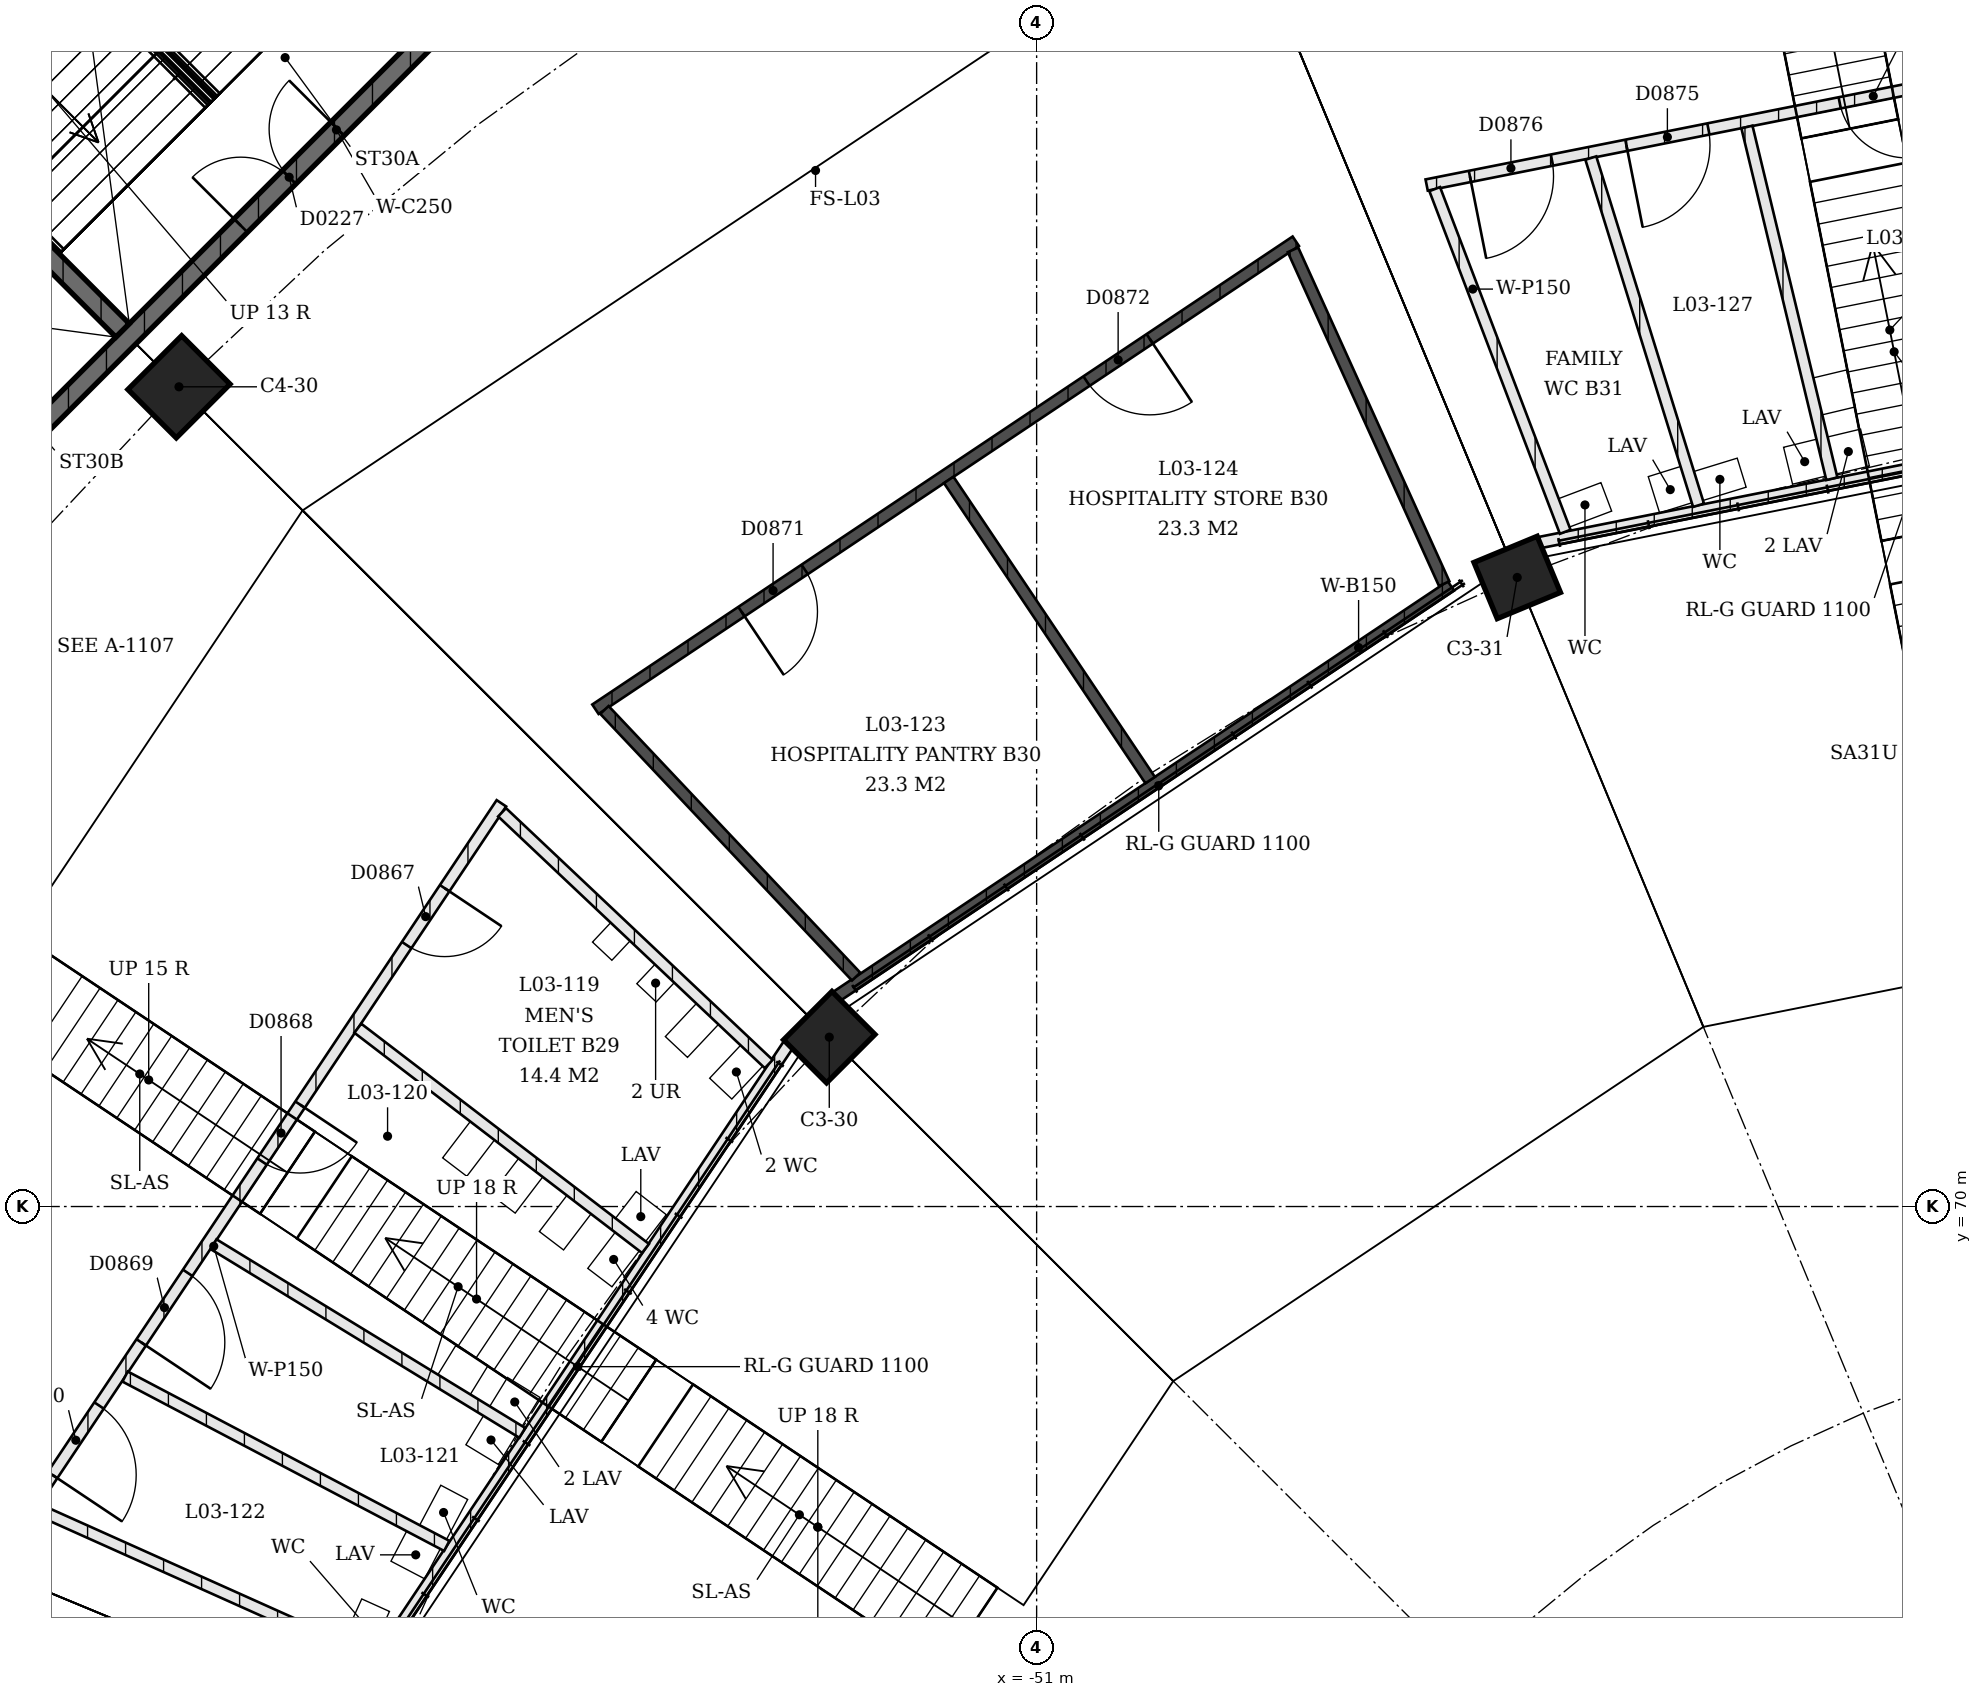
"""IFC4 building model, lengths in metres.
Left out: names, types, materials, properties, quantities, classifications, styles, units other than length and angle.
Written with IfcOpenShell. Run it as: python <this file> out.ifc"""

import sys

from ifc_helpers import new_model, si_unit, direction, frame, frame_2d, origin, origin_2d, place, context, subcontext, project, spatial, rectangle, extrude, element, fill, save


model = new_model("IFC4")
c1 = context("Model", 3, precision=1e-05, world=origin(), true_north=direction((0.0, 1.0)))
c2 = subcontext(c1, "Body", "Model", "MODEL_VIEW")
j1 = project(units=[si_unit("LENGTHUNIT", "METRE"), si_unit("PLANEANGLEUNIT", "RADIAN")], contexts=[c1])
p1 = place(None, origin())
s1 = spatial("IfcSite", under=j1, at=p1, CompositionType="ELEMENT")
p2 = place(p1, origin())
s2 = spatial("IfcBuilding", under=s1, at=p2, CompositionType="ELEMENT")
p3 = place(p2, frame((0.0, 0.0, 13.5)))
s3 = spatial("IfcBuildingStorey", under=s2, at=p3, CompositionType="ELEMENT", Elevation=13.5)
p4 = place(p3, frame((-53.728, 72.228, 0.0), z_axis=(0.0, 0.0, 1.0), x_axis=(-0.707106781187, -0.707106781187, 0.0)))
e1 = element("IfcColumn", 1, at=p4, inside=s3, PredefinedType="COLUMN", context=c2, shape_type="SweptSolid", body=[
    extrude(rectangle(XDim=0.9, YDim=0.8, at=origin_2d()), origin(), (0.0, 0.0, 1.0), 2.033),
])
p5 = place(p3, frame((-62.284, 80.784, 0.0), z_axis=(0.0, 0.0, 1.0), x_axis=(-0.707106781187, -0.707106781187, 0.0)))
e2 = element("IfcColumn", 2, at=p5, inside=s3, PredefinedType="COLUMN", context=c2, shape_type="SweptSolid", body=[
    extrude(rectangle(XDim=1.0, YDim=0.9, at=origin_2d()), origin(), (0.0, 0.0, 1.0), 4.5),
])
p6 = place(p3, frame((-44.677, 78.276, 0.0), z_axis=(0.0, 0.0, 1.0), x_axis=(-0.923879532511, -0.382683432365, 0.0)))
e3 = element("IfcColumn", 3, at=p6, inside=s3, PredefinedType="COLUMN", context=c2, shape_type="SweptSolid", body=[
    extrude(rectangle(XDim=0.9, YDim=0.8, at=origin_2d()), origin(), (0.0, 0.0, 1.0), 2.033),
])
p7 = place(p3, frame((-58.643, 85.734, 0.0), z_axis=(0.0, 0.0, 1.0), x_axis=(-0.707106781187, -0.707106781187, 0.0)))
e4 = element("IfcWall", 4, at=p7, inside=s3, PredefinedType="SHEAR", context=c2, shape_type="SweptSolid", body=[
    extrude(rectangle(XDim=12.15, YDim=0.25, at=frame_2d((6.075, 0.0))), origin(), (0.0, 0.0, 1.0), 4.09),
])
p8 = place(p7, frame((2.2, 0.0, 0.0)))
e5 = element("IfcOpeningElement", 5, at=p8, cuts=e4, PredefinedType="OPENING", context=c2, shape_type="SweptSolid", body=[
    extrude(rectangle(XDim=1.8, YDim=2.1, at=frame_2d((0.9, 1.05))), frame((0.0, 0.125, 0.0), z_axis=(0.0, -1.0, 0.0), x_axis=(1.0, 0.0, 0.0)), (0.0, 0.0, 1.0), 0.25),
])
p9 = place(p7, frame((8.15, 0.0, 0.0)))
e6 = element("IfcOpeningElement", 6, at=p9, cuts=e4, PredefinedType="OPENING", context=c2, shape_type="SweptSolid", body=[
    extrude(rectangle(XDim=1.8, YDim=2.1, at=frame_2d((0.9, 1.05))), frame((0.0, 0.125, 0.0), z_axis=(0.0, -1.0, 0.0), x_axis=(1.0, 0.0, 0.0)), (0.0, 0.0, 1.0), 0.25),
])
p10 = place(p3, frame((-63.027, 81.527, 0.0), z_axis=(0.0, 0.0, 1.0), x_axis=(-0.707106781187, 0.707106781187, 0.0)))
e7 = element("IfcWall", 7, at=p10, inside=s3, PredefinedType="SHEAR", context=c2, shape_type="SweptSolid", body=[
    extrude(rectangle(XDim=7.46, YDim=0.25, at=frame_2d((3.73, 0.0))), origin(), (0.0, 0.0, 1.0), 4.09),
])
p11 = place(p3, frame((-54.266, 72.13, 0.0), z_axis=(0.0, 0.0, 1.0), x_axis=(-0.555562437394, -0.83147482112, 0.0)))
e8 = element("IfcWall", 8, at=p11, inside=s3, PredefinedType="PARTITIONING", context=c2, shape_type="SweptSolid", body=[
    extrude(rectangle(XDim=10.125, YDim=0.15, at=frame_2d((5.062, 0.0))), origin(), (0.0, 0.0, 1.0), 3.0),
])
p12 = place(p3, frame((-58.042, 75.305, 0.0), z_axis=(0.0, 0.0, 1.0), x_axis=(-0.555569460176, -0.8314701287, 0.0)))
e9 = element("IfcWall", 9, at=p12, inside=s3, PredefinedType="PARTITIONING", context=c2, shape_type="SweptSolid", body=[
    extrude(rectangle(XDim=11.209, YDim=0.15, at=frame_2d((5.604, 0.0))), origin(), (0.0, 0.0, 1.0), 3.0),
])
p13 = place(p12, frame((1.343, 0.0, 0.0)))
e10 = element("IfcOpeningElement", 10, at=p13, cuts=e9, PredefinedType="OPENING", context=c2, shape_type="SweptSolid", body=[
    extrude(rectangle(XDim=0.9, YDim=2.1, at=frame_2d((0.45, 1.05))), frame((0.0, 0.075, 0.0), z_axis=(0.0, -1.0, 0.0), x_axis=(1.0, 0.0, 0.0)), (0.0, 0.0, 1.0), 0.15),
])
p14 = place(p12, frame((4.768, 0.0, 0.0)))
e11 = element("IfcOpeningElement", 11, at=p14, cuts=e9, PredefinedType="OPENING", context=c2, shape_type="SweptSolid", body=[
    extrude(rectangle(XDim=0.9, YDim=2.1, at=frame_2d((0.45, 1.05))), frame((0.0, 0.075, 0.0), z_axis=(0.0, -1.0, 0.0), x_axis=(1.0, 0.0, 0.0)), (0.0, 0.0, 1.0), 0.15),
])
p15 = place(p12, frame((7.43, 0.0, 0.0)))
e12 = element("IfcOpeningElement", 12, at=p15, cuts=e9, PredefinedType="OPENING", context=c2, shape_type="SweptSolid", body=[
    extrude(rectangle(XDim=1.1, YDim=2.1, at=frame_2d((0.55, 1.05))), frame((0.0, 0.075, 0.0), z_axis=(0.0, -1.0, 0.0), x_axis=(1.0, 0.0, 0.0)), (0.0, 0.0, 1.0), 0.15),
])
p16 = place(p12, frame((9.529, 0.0, 0.0)))
e13 = element("IfcOpeningElement", 13, at=p16, cuts=e9, PredefinedType="OPENING", context=c2, shape_type="SweptSolid", body=[
    extrude(rectangle(XDim=1.1, YDim=2.1, at=frame_2d((0.55, 1.05))), frame((0.0, 0.075, 0.0), z_axis=(0.0, -1.0, 0.0), x_axis=(1.0, 0.0, 0.0)), (0.0, 0.0, 1.0), 0.15),
])
p17 = place(p3, frame((-54.525, 71.875, 0.0), z_axis=(0.0, 0.0, 1.0), x_axis=(-0.727182951144, 0.686443701672, 0.0)))
e14 = element("IfcWall", 14, at=p17, inside=s3, PredefinedType="PARTITIONING", context=c2, shape_type="SweptSolid", body=[
    extrude(rectangle(XDim=4.824, YDim=0.15, at=frame_2d((2.412, 0.0))), origin(), (0.0, 0.0, 1.0), 3.0),
])
p18 = place(p3, frame((-56.146, 69.448, 0.0), z_axis=(0.0, 0.0, 1.0), x_axis=(-0.794129534094, 0.607748536057, 0.0)))
e15 = element("IfcWall", 15, at=p18, inside=s3, PredefinedType="PARTITIONING", context=c2, shape_type="SweptSolid", body=[
    extrude(rectangle(XDim=4.767, YDim=0.15, at=frame_2d((2.383, 0.0))), origin(), (0.0, 0.0, 1.0), 3.0),
])
p19 = place(p3, frame((-57.767, 67.022, 0.0), z_axis=(0.0, 0.0, 1.0), x_axis=(-0.853324930284, 0.521379481142, 0.0)))
e16 = element("IfcWall", 16, at=p19, inside=s3, PredefinedType="PARTITIONING", context=c2, shape_type="SweptSolid", body=[
    extrude(rectangle(XDim=4.761, YDim=0.15, at=frame_2d((2.38, 0.0))), origin(), (0.0, 0.0, 1.0), 3.0),
])
p20 = place(p3, frame((-58.761, 65.535, 0.0), z_axis=(0.0, 0.0, 1.0), x_axis=(-0.884880573932, 0.465817957874, 0.0)))
e17 = element("IfcWall", 17, at=p20, inside=s3, PredefinedType="PARTITIONING", context=c2, shape_type="SweptSolid", body=[
    extrude(rectangle(XDim=4.783, YDim=0.15, at=frame_2d((2.392, 0.0))), origin(), (0.0, 0.0, 1.0), 3.0),
])
p21 = place(p3, frame((-59.754, 64.048, 0.0), z_axis=(0.0, 0.0, 1.0), x_axis=(-0.912468935825, 0.409145990025, 0.0)))
e18 = element("IfcWall", 18, at=p21, inside=s3, PredefinedType="PARTITIONING", context=c2, shape_type="SweptSolid", body=[
    extrude(rectangle(XDim=4.824, YDim=0.15, at=frame_2d((2.412, 0.0))), origin(), (0.0, 0.0, 1.0), 3.0),
])
p22 = place(p3, frame((-53.63, 72.766, 0.0), z_axis=(0.0, 0.0, 1.0), x_axis=(0.831481684117, 0.555552165847, 0.0)))
e19 = element("IfcWall", 19, at=p22, inside=s3, PredefinedType="SOLIDWALL", context=c2, shape_type="SweptSolid", body=[
    extrude(rectangle(XDim=9.718, YDim=0.15, at=frame_2d((4.859, 0.0))), origin(), (0.0, 0.0, 1.0), 3.0),
])
p23 = place(p3, frame((-56.805, 76.542, 0.0), z_axis=(0.0, 0.0, 1.0), x_axis=(0.831470287315, 0.555569222791, 0.0)))
e20 = element("IfcWall", 20, at=p23, inside=s3, PredefinedType="SOLIDWALL", context=c2, shape_type="SweptSolid", body=[
    extrude(rectangle(XDim=11.082, YDim=0.15, at=frame_2d((5.541, 0.0))), origin(), (0.0, 0.0, 1.0), 3.0),
])
p24 = place(p23, frame((2.311, 0.0, 0.0)))
e21 = element("IfcOpeningElement", 21, at=p24, cuts=e20, PredefinedType="OPENING", context=c2, shape_type="SweptSolid", body=[
    extrude(rectangle(XDim=1.0, YDim=2.1, at=frame_2d((0.5, 1.05))), frame((0.0, 0.075, 0.0), z_axis=(0.0, -1.0, 0.0), x_axis=(1.0, 0.0, 0.0)), (0.0, 0.0, 1.0), 0.15),
])
p25 = place(p23, frame((7.771, 0.0, 0.0)))
e22 = element("IfcOpeningElement", 22, at=p25, cuts=e20, PredefinedType="OPENING", context=c2, shape_type="SweptSolid", body=[
    extrude(rectangle(XDim=1.0, YDim=2.1, at=frame_2d((0.5, 1.05))), frame((0.0, 0.075, 0.0), z_axis=(0.0, -1.0, 0.0), x_axis=(1.0, 0.0, 0.0)), (0.0, 0.0, 1.0), 0.15),
])
p26 = place(p3, frame((-53.375, 73.025, 0.0), z_axis=(0.0, 0.0, 1.0), x_axis=(-0.686443701672, 0.727182951144, 0.0)))
e23 = element("IfcWall", 23, at=p26, inside=s3, PredefinedType="SOLIDWALL", context=c2, shape_type="SweptSolid", body=[
    extrude(rectangle(XDim=4.824, YDim=0.15, at=frame_2d((2.412, 0.0))), origin(), (0.0, 0.0, 1.0), 3.0),
])
p27 = place(p3, frame((-49.506, 75.61, 0.0), z_axis=(0.0, 0.0, 1.0), x_axis=(-0.557185009832, 0.830388381915, 0.0)))
e24 = element("IfcWall", 24, at=p27, inside=s3, PredefinedType="SOLIDWALL", context=c2, shape_type="SweptSolid", body=[
    extrude(rectangle(XDim=4.757, YDim=0.15, at=frame_2d((2.378, 0.0))), origin(), (0.0, 0.0, 1.0), 3.0),
])
p28 = place(p3, frame((-45.638, 78.195, 0.0), z_axis=(0.0, 0.0, 1.0), x_axis=(-0.412593178732, 0.910915401596, 0.0)))
e25 = element("IfcWall", 25, at=p28, inside=s3, PredefinedType="SOLIDWALL", context=c2, shape_type="SweptSolid", body=[
    extrude(rectangle(XDim=4.821, YDim=0.15, at=frame_2d((2.411, 0.0))), origin(), (0.0, 0.0, 1.0), 3.0),
])
p29 = place(p3, frame((-34.5, 80.7, 0.0), z_axis=(0.0, 0.0, 1.0), x_axis=(-0.980787996346, -0.195076667554, 0.0)))
e26 = element("IfcWall", 26, at=p29, inside=s3, PredefinedType="PARTITIONING", context=c2, shape_type="SweptSolid", body=[
    extrude(rectangle(XDim=10.073, YDim=0.15, at=frame_2d((5.037, 0.0))), origin(), (0.0, 0.0, 1.0), 3.0),
])
p30 = place(p3, frame((-34.875, 85.626, 0.0), z_axis=(0.0, 0.0, 1.0), x_axis=(-0.980786208969, -0.195085653744, 0.0)))
e27 = element("IfcWall", 27, at=p30, inside=s3, PredefinedType="PARTITIONING", context=c2, shape_type="SweptSolid", body=[
    extrude(rectangle(XDim=11.209, YDim=0.15, at=frame_2d((5.604, 0.0))), origin(), (0.0, 0.0, 1.0), 3.0),
])
p31 = place(p30, frame((1.343, 0.0, 0.0)))
e28 = element("IfcOpeningElement", 28, at=p31, cuts=e27, PredefinedType="OPENING", context=c2, shape_type="SweptSolid", body=[
    extrude(rectangle(XDim=0.9, YDim=2.1, at=frame_2d((0.45, 1.05))), frame((0.0, 0.075, 0.0), z_axis=(0.0, -1.0, 0.0), x_axis=(1.0, 0.0, 0.0)), (0.0, 0.0, 1.0), 0.15),
])
p32 = place(p30, frame((4.768, 0.0, 0.0)))
e29 = element("IfcOpeningElement", 29, at=p32, cuts=e27, PredefinedType="OPENING", context=c2, shape_type="SweptSolid", body=[
    extrude(rectangle(XDim=0.9, YDim=2.1, at=frame_2d((0.45, 1.05))), frame((0.0, 0.075, 0.0), z_axis=(0.0, -1.0, 0.0), x_axis=(1.0, 0.0, 0.0)), (0.0, 0.0, 1.0), 0.15),
])
p33 = place(p30, frame((7.43, 0.0, 0.0)))
e30 = element("IfcOpeningElement", 30, at=p33, cuts=e27, PredefinedType="OPENING", context=c2, shape_type="SweptSolid", body=[
    extrude(rectangle(XDim=1.1, YDim=2.1, at=frame_2d((0.55, 1.05))), frame((0.0, 0.075, 0.0), z_axis=(0.0, -1.0, 0.0), x_axis=(1.0, 0.0, 0.0)), (0.0, 0.0, 1.0), 0.15),
])
p34 = place(p30, frame((9.529, 0.0, 0.0)))
e31 = element("IfcOpeningElement", 31, at=p34, cuts=e27, PredefinedType="OPENING", context=c2, shape_type="SweptSolid", body=[
    extrude(rectangle(XDim=1.1, YDim=2.1, at=frame_2d((0.55, 1.05))), frame((0.0, 0.075, 0.0), z_axis=(0.0, -1.0, 0.0), x_axis=(1.0, 0.0, 0.0)), (0.0, 0.0, 1.0), 0.15),
])
p35 = place(p3, frame((-40.537, 79.575, 0.0), z_axis=(0.0, 0.0, 1.0), x_axis=(-0.234720740692, 0.972062844619, 0.0)))
e32 = element("IfcWall", 32, at=p35, inside=s3, PredefinedType="PARTITIONING", context=c2, shape_type="SweptSolid", body=[
    extrude(rectangle(XDim=4.761, YDim=0.15, at=frame_2d((2.38, 0.0))), origin(), (0.0, 0.0, 1.0), 3.0),
])
p36 = place(p3, frame((-42.291, 79.226, 0.0), z_axis=(0.0, 0.0, 1.0), x_axis=(-0.296312515745, 0.955091039123, 0.0)))
e33 = element("IfcWall", 33, at=p36, inside=s3, PredefinedType="PARTITIONING", context=c2, shape_type="SweptSolid", body=[
    extrude(rectangle(XDim=4.783, YDim=0.15, at=frame_2d((2.392, 0.0))), origin(), (0.0, 0.0, 1.0), 3.0),
])
p37 = place(p3, frame((-44.045, 78.877, 0.0), z_axis=(0.0, 0.0, 1.0), x_axis=(-0.355921670207, 0.934515791561, 0.0)))
e34 = element("IfcWall", 34, at=p37, inside=s3, PredefinedType="PARTITIONING", context=c2, shape_type="SweptSolid", body=[
    extrude(rectangle(XDim=4.824, YDim=0.15, at=frame_2d((2.412, 0.0))), origin(), (0.0, 0.0, 1.0), 3.0),
])
p38 = place(p8, origin())
e35 = element("IfcDoor", 35, at=p38, inside=s3, OperationType="DOUBLE_DOOR_SINGLE_SWING", PredefinedType="DOOR", context=c2, shape_type="SweptSolid", body=[
    extrude(rectangle(XDim=1.8, YDim=2.1, at=frame_2d((0.9, 1.05))), frame((0.0, 0.025, 0.0), z_axis=(0.0, -1.0, 0.0), x_axis=(1.0, 0.0, 0.0)), (0.0, 0.0, 1.0), 0.05),
])
fill(e5, e35)
p39 = place(p13, origin())
e36 = element("IfcDoor", 36, at=p39, inside=s3, OperationType="SINGLE_SWING_RIGHT", PredefinedType="DOOR", context=c2, shape_type="SweptSolid", body=[
    extrude(rectangle(XDim=0.9, YDim=2.1, at=frame_2d((0.45, 1.05))), frame((0.0, 0.025, 0.0), z_axis=(0.0, -1.0, 0.0), x_axis=(1.0, 0.0, 0.0)), (0.0, 0.0, 1.0), 0.05),
])
fill(e10, e36)
p40 = place(p14, origin())
e37 = element("IfcDoor", 37, at=p40, inside=s3, OperationType="SINGLE_SWING_RIGHT", PredefinedType="DOOR", context=c2, shape_type="SweptSolid", body=[
    extrude(rectangle(XDim=0.9, YDim=2.1, at=frame_2d((0.45, 1.05))), frame((0.0, 0.025, 0.0), z_axis=(0.0, -1.0, 0.0), x_axis=(1.0, 0.0, 0.0)), (0.0, 0.0, 1.0), 0.05),
])
fill(e11, e37)
p41 = place(p15, origin())
e38 = element("IfcDoor", 38, at=p41, inside=s3, OperationType="SINGLE_SWING_LEFT", PredefinedType="DOOR", context=c2, shape_type="SweptSolid", body=[
    extrude(rectangle(XDim=1.1, YDim=2.1, at=frame_2d((0.55, 1.05))), frame((0.0, 0.025, 0.0), z_axis=(0.0, -1.0, 0.0), x_axis=(1.0, 0.0, 0.0)), (0.0, 0.0, 1.0), 0.05),
])
fill(e12, e38)
p42 = place(p16, origin())
e39 = element("IfcDoor", 39, at=p42, inside=s3, OperationType="SINGLE_SWING_LEFT", PredefinedType="DOOR", context=c2, shape_type="SweptSolid", body=[
    extrude(rectangle(XDim=1.1, YDim=2.1, at=frame_2d((0.55, 1.05))), frame((0.0, 0.025, 0.0), z_axis=(0.0, -1.0, 0.0), x_axis=(1.0, 0.0, 0.0)), (0.0, 0.0, 1.0), 0.05),
])
fill(e13, e39)
p43 = place(p24, origin())
e40 = element("IfcDoor", 40, at=p43, inside=s3, OperationType="SINGLE_SWING_LEFT", PredefinedType="DOOR", context=c2, shape_type="SweptSolid", body=[
    extrude(rectangle(XDim=1.0, YDim=2.1, at=frame_2d((0.5, 1.05))), frame((0.0, 0.025, 0.0), z_axis=(0.0, -1.0, 0.0), x_axis=(1.0, 0.0, 0.0)), (0.0, 0.0, 1.0), 0.05),
])
fill(e21, e40)
p44 = place(p25, origin())
e41 = element("IfcDoor", 41, at=p44, inside=s3, OperationType="SINGLE_SWING_RIGHT", PredefinedType="DOOR", context=c2, shape_type="SweptSolid", body=[
    extrude(rectangle(XDim=1.0, YDim=2.1, at=frame_2d((0.5, 1.05))), frame((0.0, 0.025, 0.0), z_axis=(0.0, -1.0, 0.0), x_axis=(1.0, 0.0, 0.0)), (0.0, 0.0, 1.0), 0.05),
])
fill(e22, e41)
p45 = place(p32, origin())
e42 = element("IfcDoor", 42, at=p45, inside=s3, OperationType="SINGLE_SWING_RIGHT", PredefinedType="DOOR", context=c2, shape_type="SweptSolid", body=[
    extrude(rectangle(XDim=0.9, YDim=2.1, at=frame_2d((0.45, 1.05))), frame((0.0, 0.025, 0.0), z_axis=(0.0, -1.0, 0.0), x_axis=(1.0, 0.0, 0.0)), (0.0, 0.0, 1.0), 0.05),
])
fill(e29, e42)
p46 = place(p33, origin())
e43 = element("IfcDoor", 43, at=p46, inside=s3, OperationType="SINGLE_SWING_LEFT", PredefinedType="DOOR", context=c2, shape_type="SweptSolid", body=[
    extrude(rectangle(XDim=1.1, YDim=2.1, at=frame_2d((0.55, 1.05))), frame((0.0, 0.025, 0.0), z_axis=(0.0, -1.0, 0.0), x_axis=(1.0, 0.0, 0.0)), (0.0, 0.0, 1.0), 0.05),
])
fill(e30, e43)
p47 = place(p34, origin())
e44 = element("IfcDoor", 44, at=p47, inside=s3, OperationType="SINGLE_SWING_LEFT", PredefinedType="DOOR", context=c2, shape_type="SweptSolid", body=[
    extrude(rectangle(XDim=1.1, YDim=2.1, at=frame_2d((0.55, 1.05))), frame((0.0, 0.025, 0.0), z_axis=(0.0, -1.0, 0.0), x_axis=(1.0, 0.0, 0.0)), (0.0, 0.0, 1.0), 0.05),
])
fill(e31, e44)
save(model, sys.argv[1])
